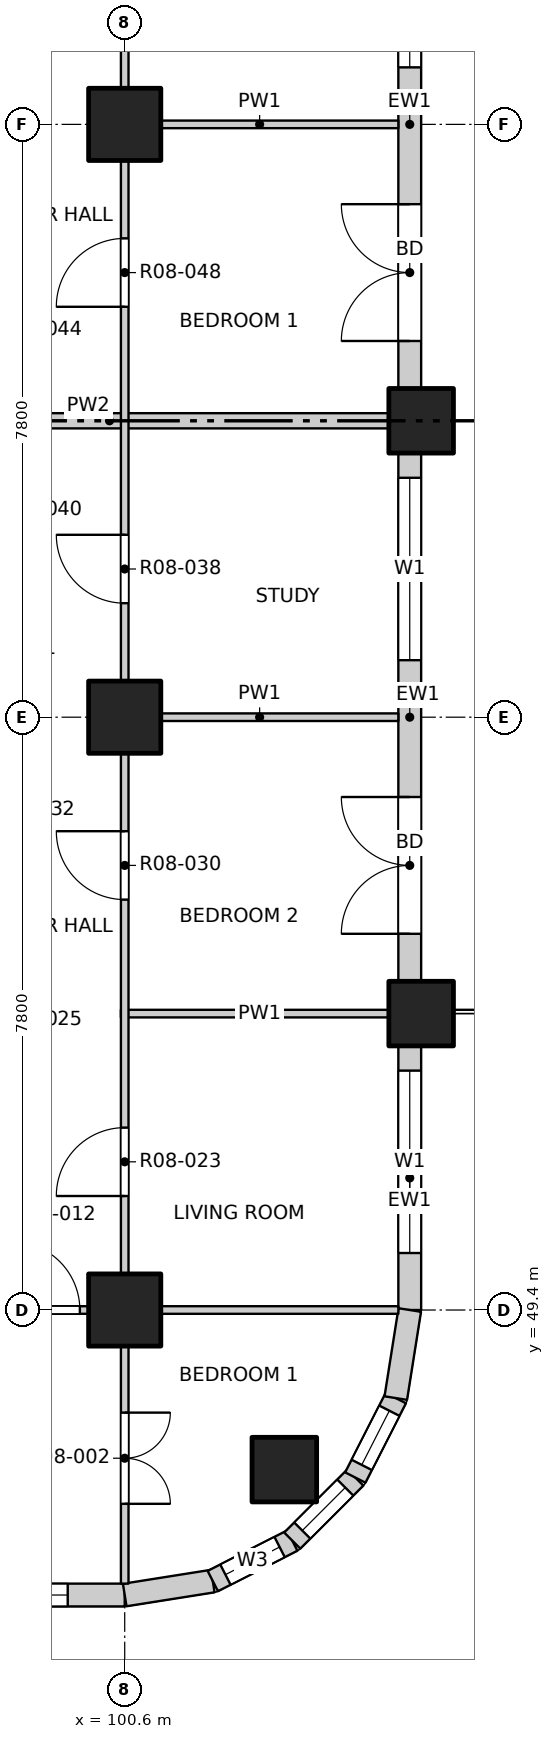
"""IFC4 building model, lengths in metres.
Left out: names, types, materials, properties, quantities, classifications, styles, units other than length and angle.
Written with IfcOpenShell. Run it as: python <this file> out.ifc"""

import sys

from ifc_helpers import new_model, si_unit, direction, frame, frame_2d, origin, origin_2d, place, context, subcontext, project, spatial, rectangle, extrude, element, fill, save


model = new_model("IFC4")
c1 = context("Model", 3, precision=1e-05, world=origin(), true_north=direction((0.0, 1.0)))
c2 = subcontext(c1, "Body", "Model", "MODEL_VIEW")
j1 = project(units=[si_unit("LENGTHUNIT", "METRE"), si_unit("PLANEANGLEUNIT", "RADIAN")], contexts=[c1])
p1 = place(None, origin())
s1 = spatial("IfcSite", under=j1, at=p1, CompositionType="ELEMENT")
p2 = place(p1, origin())
s2 = spatial("IfcBuilding", under=s1, at=p2, CompositionType="ELEMENT")
p3 = place(p2, frame((0.0, 0.0, 99.9)))
s3 = spatial("IfcBuildingStorey", under=s2, at=p3, CompositionType="ELEMENT", Elevation=99.9)
for number, where, z_axis, x_axis in (
    (1, (102.7, 47.3, -0.3), (0.0, 0.0, 1.0), (1.0, 0.0, 0.0)),
    (2, (104.5, 53.3, -0.3), (0.0, 0.0, 1.0), (1.0, 0.0, 0.0)),
    (3, (104.5, 61.1, -0.3), (0.0, 0.0, 1.0), (1.0, 0.0, 0.0)),
):
    element("IfcColumn", number, at=place(p3, frame(where, z_axis=z_axis, x_axis=x_axis)), inside=s3, PredefinedType="COLUMN", context=c2, shape_type="SweptSolid", body=[
        extrude(rectangle(XDim=0.85, YDim=0.85, at=origin_2d()), origin(), (0.0, 0.0, 1.0), 3.45),
    ])
for number, where, z_axis, x_axis in (
    (4, (100.6, 49.4, -0.3), (0.0, 0.0, 1.0), (1.0, 0.0, 0.0)),
    (5, (100.6, 57.2, -0.3), (0.0, 0.0, 1.0), (1.0, 0.0, 0.0)),
    (6, (100.6, 65.0, -0.3), (0.0, 0.0, 1.0), (1.0, 0.0, 0.0)),
):
    element("IfcColumn", number, at=place(p3, frame(where, z_axis=z_axis, x_axis=x_axis)), inside=s3, PredefinedType="COLUMN", context=c2, shape_type="SweptSolid", body=[
        extrude(rectangle(XDim=0.95, YDim=0.95, at=origin_2d()), origin(), (0.0, 0.0, 1.0), 3.45),
    ])
p4 = place(p3, frame((97.125, 45.65, 0.0), z_axis=(0.0, 0.0, 1.0), x_axis=(1.0, 0.0, 0.0)))
e7 = element("IfcWall", 7, at=p4, inside=s3, PredefinedType="SOLIDWALL", context=c2, shape_type="SweptSolid", body=[
    extrude(rectangle(XDim=3.475, YDim=0.3, at=frame_2d((1.738, 0.0))), origin(), (0.0, 0.0, 1.0), 2.7),
])
p5 = place(p4, frame((0.325, 0.0, 0.9)))
e8 = element("IfcOpeningElement", 8, at=p5, cuts=e7, PredefinedType="OPENING", context=c2, shape_type="SweptSolid", body=[
    extrude(rectangle(XDim=2.4, YDim=1.8, at=frame_2d((1.2, 0.9))), frame((0.0, 0.16, 0.0), z_axis=(0.0, -1.0, 0.0), x_axis=(1.0, 0.0, 0.0)), (0.0, 0.0, 1.0), 0.32),
])
p6 = place(p3, frame((104.35, 49.4, 0.0), z_axis=(0.0, 0.0, 1.0), x_axis=(0.0, 1.0, 0.0)))
e9 = element("IfcWall", 9, at=p6, inside=s3, PredefinedType="SOLIDWALL", context=c2, shape_type="SweptSolid", body=[
    extrude(rectangle(XDim=3.475, YDim=0.3, at=frame_2d((1.738, 0.0))), origin(), (0.0, 0.0, 1.0), 2.7),
])
p7 = place(p6, frame((0.75, 0.0, 0.9)))
e10 = element("IfcOpeningElement", 10, at=p7, cuts=e9, PredefinedType="OPENING", context=c2, shape_type="SweptSolid", body=[
    extrude(rectangle(XDim=2.4, YDim=1.8, at=frame_2d((1.2, 0.9))), frame((0.0, 0.16, 0.0), z_axis=(0.0, -1.0, 0.0), x_axis=(1.0, 0.0, 0.0)), (0.0, 0.0, 1.0), 0.32),
])
p8 = place(p3, frame((104.35, 53.725, 0.0), z_axis=(0.0, 0.0, 1.0), x_axis=(0.0, 1.0, 0.0)))
e11 = element("IfcWall", 11, at=p8, inside=s3, PredefinedType="SOLIDWALL", context=c2, shape_type="SweptSolid", body=[
    extrude(rectangle(XDim=6.95, YDim=0.3, at=frame_2d((3.475, 0.0))), origin(), (0.0, 0.0, 1.0), 2.7),
])
p9 = place(p8, frame((0.625, 0.0, 0.0)))
e12 = element("IfcOpeningElement", 12, at=p9, cuts=e11, PredefinedType="OPENING", context=c2, shape_type="SweptSolid", body=[
    extrude(rectangle(XDim=1.8, YDim=2.4, at=frame_2d((0.9, 1.2))), frame((0.0, 0.16, 0.0), z_axis=(0.0, -1.0, 0.0), x_axis=(1.0, 0.0, 0.0)), (0.0, 0.0, 1.0), 0.32),
])
p10 = place(p8, frame((4.225, 0.0, 0.9)))
e13 = element("IfcOpeningElement", 13, at=p10, cuts=e11, PredefinedType="OPENING", context=c2, shape_type="SweptSolid", body=[
    extrude(rectangle(XDim=2.4, YDim=1.8, at=frame_2d((1.2, 0.9))), frame((0.0, 0.16, 0.0), z_axis=(0.0, -1.0, 0.0), x_axis=(1.0, 0.0, 0.0)), (0.0, 0.0, 1.0), 0.32),
])
p11 = place(p3, frame((104.35, 61.525, 0.0), z_axis=(0.0, 0.0, 1.0), x_axis=(0.0, 1.0, 0.0)))
e14 = element("IfcWall", 14, at=p11, inside=s3, PredefinedType="SOLIDWALL", context=c2, shape_type="SweptSolid", body=[
    extrude(rectangle(XDim=6.95, YDim=0.3, at=frame_2d((3.475, 0.0))), origin(), (0.0, 0.0, 1.0), 2.7),
])
p12 = place(p11, frame((0.625, 0.0, 0.0)))
e15 = element("IfcOpeningElement", 15, at=p12, cuts=e14, PredefinedType="OPENING", context=c2, shape_type="SweptSolid", body=[
    extrude(rectangle(XDim=1.8, YDim=2.4, at=frame_2d((0.9, 1.2))), frame((0.0, 0.16, 0.0), z_axis=(0.0, -1.0, 0.0), x_axis=(1.0, 0.0, 0.0)), (0.0, 0.0, 1.0), 0.32),
])
p13 = place(p11, frame((4.225, 0.0, 0.9)))
e16 = element("IfcOpeningElement", 16, at=p13, cuts=e14, PredefinedType="OPENING", context=c2, shape_type="SweptSolid", body=[
    extrude(rectangle(XDim=2.4, YDim=1.8, at=frame_2d((1.2, 0.9))), frame((0.0, 0.16, 0.0), z_axis=(0.0, -1.0, 0.0), x_axis=(1.0, 0.0, 0.0)), (0.0, 0.0, 1.0), 0.32),
])
p14 = place(p3, frame((100.6, 45.65, 0.0), z_axis=(0.0, 0.0, 1.0), x_axis=(0.987678452879, 0.156496880861, 0.0)))
e17 = element("IfcWall", 17, at=p14, inside=s3, PredefinedType="SOLIDWALL", context=c2, shape_type="SweptSolid", body=[
    extrude(rectangle(XDim=1.173, YDim=0.3, at=frame_2d((0.586, 0.0))), origin(), (0.0, 0.0, 1.0), 2.7),
])
p15 = place(p3, frame((101.759, 45.833, 0.0), z_axis=(0.0, 0.0, 1.0), x_axis=(0.890988677504, 0.454025524128, 0.0)))
e18 = element("IfcWall", 18, at=p15, inside=s3, PredefinedType="SOLIDWALL", context=c2, shape_type="SweptSolid", body=[
    extrude(rectangle(XDim=1.173, YDim=0.3, at=frame_2d((0.587, 0.0))), origin(), (0.0, 0.0, 1.0), 2.7),
])
p16 = place(p15, frame((0.187, 0.0, 0.9)))
e19 = element("IfcOpeningElement", 19, at=p16, cuts=e18, PredefinedType="OPENING", context=c2, shape_type="SweptSolid", body=[
    extrude(rectangle(XDim=0.8, YDim=1.2, at=frame_2d((0.4, 0.6))), frame((0.0, 0.16, 0.0), z_axis=(0.0, -1.0, 0.0), x_axis=(1.0, 0.0, 0.0)), (0.0, 0.0, 1.0), 0.32),
])
p17 = place(p3, frame((102.804, 46.366, 0.0), z_axis=(0.0, 0.0, 1.0), x_axis=(0.707106781187, 0.707106781187, 0.0)))
e20 = element("IfcWall", 20, at=p17, inside=s3, PredefinedType="SOLIDWALL", context=c2, shape_type="SweptSolid", body=[
    extrude(rectangle(XDim=1.173, YDim=0.3, at=frame_2d((0.586, 0.0))), origin(), (0.0, 0.0, 1.0), 2.7),
])
p18 = place(p17, frame((0.187, 0.0, 0.9)))
e21 = element("IfcOpeningElement", 21, at=p18, cuts=e20, PredefinedType="OPENING", context=c2, shape_type="SweptSolid", body=[
    extrude(rectangle(XDim=0.8, YDim=1.2, at=frame_2d((0.4, 0.6))), frame((0.0, 0.16, 0.0), z_axis=(0.0, -1.0, 0.0), x_axis=(1.0, 0.0, 0.0)), (0.0, 0.0, 1.0), 0.32),
])
p19 = place(p3, frame((103.634, 47.196, 0.0), z_axis=(0.0, 0.0, 1.0), x_axis=(0.454025524128, 0.890988677504, 0.0)))
e22 = element("IfcWall", 22, at=p19, inside=s3, PredefinedType="SOLIDWALL", context=c2, shape_type="SweptSolid", body=[
    extrude(rectangle(XDim=1.173, YDim=0.3, at=frame_2d((0.587, 0.0))), origin(), (0.0, 0.0, 1.0), 2.7),
])
p20 = place(p19, frame((0.187, 0.0, 0.9)))
e23 = element("IfcOpeningElement", 23, at=p20, cuts=e22, PredefinedType="OPENING", context=c2, shape_type="SweptSolid", body=[
    extrude(rectangle(XDim=0.8, YDim=1.2, at=frame_2d((0.4, 0.6))), frame((0.0, 0.16, 0.0), z_axis=(0.0, -1.0, 0.0), x_axis=(1.0, 0.0, 0.0)), (0.0, 0.0, 1.0), 0.32),
])
p21 = place(p3, frame((104.167, 48.241, 0.0), z_axis=(0.0, 0.0, 1.0), x_axis=(0.156496880861, 0.987678452879, 0.0)))
e24 = element("IfcWall", 24, at=p21, inside=s3, PredefinedType="SOLIDWALL", context=c2, shape_type="SweptSolid", body=[
    extrude(rectangle(XDim=1.173, YDim=0.3, at=frame_2d((0.586, 0.0))), origin(), (0.0, 0.0, 1.0), 2.7),
])
p22 = place(p3, frame((65.8, 49.4, 0.0), z_axis=(0.0, 0.0, 1.0), x_axis=(1.0, 0.0, 0.0)))
e25 = element("IfcWall", 25, at=p22, inside=s3, PredefinedType="PARTITIONING", context=c2, shape_type="SweptSolid", body=[
    extrude(rectangle(XDim=38.4, YDim=0.1, at=frame_2d((19.2, 0.0))), origin(), (0.0, 0.0, 1.0), 3.15),
])
p23 = place(p22, frame((4.19, 0.0, 0.0)))
e26 = element("IfcOpeningElement", 26, at=p23, cuts=e25, PredefinedType="OPENING", context=c2, shape_type="SweptSolid", body=[
    extrude(rectangle(XDim=0.9, YDim=2.1, at=frame_2d((0.45, 1.05))), frame((0.0, 0.06, 0.0), z_axis=(0.0, -1.0, 0.0), x_axis=(1.0, 0.0, 0.0)), (0.0, 0.0, 1.0), 0.12),
])
p24 = place(p22, frame((9.0, 0.0, 0.0)))
e27 = element("IfcOpeningElement", 27, at=p24, cuts=e25, PredefinedType="OPENING", context=c2, shape_type="SweptSolid", body=[
    extrude(rectangle(XDim=0.9, YDim=2.1, at=frame_2d((0.45, 1.05))), frame((0.0, 0.06, 0.0), z_axis=(0.0, -1.0, 0.0), x_axis=(1.0, 0.0, 0.0)), (0.0, 0.0, 1.0), 0.12),
])
p25 = place(p22, frame((12.9, 0.0, 0.0)))
e28 = element("IfcOpeningElement", 28, at=p25, cuts=e25, PredefinedType="OPENING", context=c2, shape_type="SweptSolid", body=[
    extrude(rectangle(XDim=0.9, YDim=2.1, at=frame_2d((0.45, 1.05))), frame((0.0, 0.06, 0.0), z_axis=(0.0, -1.0, 0.0), x_axis=(1.0, 0.0, 0.0)), (0.0, 0.0, 1.0), 0.12),
])
p26 = place(p22, frame((16.8, 0.0, 0.0)))
e29 = element("IfcOpeningElement", 29, at=p26, cuts=e25, PredefinedType="OPENING", context=c2, shape_type="SweptSolid", body=[
    extrude(rectangle(XDim=0.9, YDim=2.1, at=frame_2d((0.45, 1.05))), frame((0.0, 0.06, 0.0), z_axis=(0.0, -1.0, 0.0), x_axis=(1.0, 0.0, 0.0)), (0.0, 0.0, 1.0), 0.12),
])
p27 = place(p22, frame((20.7, 0.0, 0.0)))
e30 = element("IfcOpeningElement", 30, at=p27, cuts=e25, PredefinedType="OPENING", context=c2, shape_type="SweptSolid", body=[
    extrude(rectangle(XDim=0.9, YDim=2.1, at=frame_2d((0.45, 1.05))), frame((0.0, 0.06, 0.0), z_axis=(0.0, -1.0, 0.0), x_axis=(1.0, 0.0, 0.0)), (0.0, 0.0, 1.0), 0.12),
])
p28 = place(p22, frame((24.6, 0.0, 0.0)))
e31 = element("IfcOpeningElement", 31, at=p28, cuts=e25, PredefinedType="OPENING", context=c2, shape_type="SweptSolid", body=[
    extrude(rectangle(XDim=0.9, YDim=2.1, at=frame_2d((0.45, 1.05))), frame((0.0, 0.06, 0.0), z_axis=(0.0, -1.0, 0.0), x_axis=(1.0, 0.0, 0.0)), (0.0, 0.0, 1.0), 0.12),
])
p29 = place(p22, frame((28.5, 0.0, 0.0)))
e32 = element("IfcOpeningElement", 32, at=p29, cuts=e25, PredefinedType="OPENING", context=c2, shape_type="SweptSolid", body=[
    extrude(rectangle(XDim=0.9, YDim=2.1, at=frame_2d((0.45, 1.05))), frame((0.0, 0.06, 0.0), z_axis=(0.0, -1.0, 0.0), x_axis=(1.0, 0.0, 0.0)), (0.0, 0.0, 1.0), 0.12),
])
p30 = place(p22, frame((33.31, 0.0, 0.0)))
e33 = element("IfcOpeningElement", 33, at=p30, cuts=e25, PredefinedType="OPENING", context=c2, shape_type="SweptSolid", body=[
    extrude(rectangle(XDim=0.9, YDim=2.1, at=frame_2d((0.45, 1.05))), frame((0.0, 0.06, 0.0), z_axis=(0.0, -1.0, 0.0), x_axis=(1.0, 0.0, 0.0)), (0.0, 0.0, 1.0), 0.12),
])
for number, where, z_axis, x_axis in (
    (34, (100.55, 53.3, 0.0), (0.0, 0.0, 1.0), (1.0, 0.0, 0.0)),
    (35, (100.55, 57.2, 0.0), (0.0, 0.0, 1.0), (1.0, 0.0, 0.0)),
):
    element("IfcWall", number, at=place(p3, frame(where, z_axis=z_axis, x_axis=x_axis)), inside=s3, PredefinedType="PARTITIONING", context=c2, shape_type="SweptSolid", body=[
        extrude(rectangle(XDim=3.65, YDim=0.1, at=frame_2d((1.825, 0.0))), origin(), (0.0, 0.0, 1.0), 3.15),
    ])
p31 = place(p3, frame((96.6, 61.1, 0.0), z_axis=(0.0, 0.0, 1.0), x_axis=(1.0, 0.0, 0.0)))
e36 = element("IfcWall", 36, at=p31, inside=s3, PredefinedType="PARTITIONING", context=c2, shape_type="SweptSolid", body=[
    extrude(rectangle(XDim=7.6, YDim=0.2, at=frame_2d((3.8, 0.0))), origin(), (0.0, 0.0, 1.0), 2.55),
])
p32 = place(p3, frame((100.55, 65.0, 0.0), z_axis=(0.0, 0.0, 1.0), x_axis=(1.0, 0.0, 0.0)))
e37 = element("IfcWall", 37, at=p32, inside=s3, PredefinedType="PARTITIONING", context=c2, shape_type="SweptSolid", body=[
    extrude(rectangle(XDim=3.65, YDim=0.1, at=frame_2d((1.825, 0.0))), origin(), (0.0, 0.0, 1.0), 3.15),
])
p33 = place(p3, frame((100.6, 45.8, 0.0), z_axis=(0.0, 0.0, 1.0), x_axis=(0.0, 1.0, 0.0)))
e38 = element("IfcWall", 38, at=p33, inside=s3, PredefinedType="PARTITIONING", context=c2, shape_type="SweptSolid", body=[
    extrude(rectangle(XDim=38.4, YDim=0.1, at=frame_2d((19.2, 0.0))), origin(), (0.0, 0.0, 1.0), 3.15),
])
p34 = place(p33, frame((1.05, 0.0, 0.0)))
e39 = element("IfcOpeningElement", 39, at=p34, cuts=e38, PredefinedType="OPENING", context=c2, shape_type="SweptSolid", body=[
    extrude(rectangle(XDim=1.2, YDim=2.1, at=frame_2d((0.6, 1.05))), frame((0.0, 0.06, 0.0), z_axis=(0.0, -1.0, 0.0), x_axis=(1.0, 0.0, 0.0)), (0.0, 0.0, 1.0), 0.12),
])
p35 = place(p33, frame((5.1, 0.0, 0.0)))
e40 = element("IfcOpeningElement", 40, at=p35, cuts=e38, PredefinedType="OPENING", context=c2, shape_type="SweptSolid", body=[
    extrude(rectangle(XDim=0.9, YDim=2.1, at=frame_2d((0.45, 1.05))), frame((0.0, 0.06, 0.0), z_axis=(0.0, -1.0, 0.0), x_axis=(1.0, 0.0, 0.0)), (0.0, 0.0, 1.0), 0.12),
])
p36 = place(p33, frame((9.0, 0.0, 0.0)))
e41 = element("IfcOpeningElement", 41, at=p36, cuts=e38, PredefinedType="OPENING", context=c2, shape_type="SweptSolid", body=[
    extrude(rectangle(XDim=0.9, YDim=2.1, at=frame_2d((0.45, 1.05))), frame((0.0, 0.06, 0.0), z_axis=(0.0, -1.0, 0.0), x_axis=(1.0, 0.0, 0.0)), (0.0, 0.0, 1.0), 0.12),
])
p37 = place(p33, frame((12.9, 0.0, 0.0)))
e42 = element("IfcOpeningElement", 42, at=p37, cuts=e38, PredefinedType="OPENING", context=c2, shape_type="SweptSolid", body=[
    extrude(rectangle(XDim=0.9, YDim=2.1, at=frame_2d((0.45, 1.05))), frame((0.0, 0.06, 0.0), z_axis=(0.0, -1.0, 0.0), x_axis=(1.0, 0.0, 0.0)), (0.0, 0.0, 1.0), 0.12),
])
p38 = place(p33, frame((16.8, 0.0, 0.0)))
e43 = element("IfcOpeningElement", 43, at=p38, cuts=e38, PredefinedType="OPENING", context=c2, shape_type="SweptSolid", body=[
    extrude(rectangle(XDim=0.9, YDim=2.1, at=frame_2d((0.45, 1.05))), frame((0.0, 0.06, 0.0), z_axis=(0.0, -1.0, 0.0), x_axis=(1.0, 0.0, 0.0)), (0.0, 0.0, 1.0), 0.12),
])
p39 = place(p33, frame((20.7, 0.0, 0.0)))
e44 = element("IfcOpeningElement", 44, at=p39, cuts=e38, PredefinedType="OPENING", context=c2, shape_type="SweptSolid", body=[
    extrude(rectangle(XDim=0.9, YDim=2.1, at=frame_2d((0.45, 1.05))), frame((0.0, 0.06, 0.0), z_axis=(0.0, -1.0, 0.0), x_axis=(1.0, 0.0, 0.0)), (0.0, 0.0, 1.0), 0.12),
])
p40 = place(p33, frame((24.6, 0.0, 0.0)))
e45 = element("IfcOpeningElement", 45, at=p40, cuts=e38, PredefinedType="OPENING", context=c2, shape_type="SweptSolid", body=[
    extrude(rectangle(XDim=0.9, YDim=2.1, at=frame_2d((0.45, 1.05))), frame((0.0, 0.06, 0.0), z_axis=(0.0, -1.0, 0.0), x_axis=(1.0, 0.0, 0.0)), (0.0, 0.0, 1.0), 0.12),
])
p41 = place(p33, frame((28.5, 0.0, 0.0)))
e46 = element("IfcOpeningElement", 46, at=p41, cuts=e38, PredefinedType="OPENING", context=c2, shape_type="SweptSolid", body=[
    extrude(rectangle(XDim=0.9, YDim=2.1, at=frame_2d((0.45, 1.05))), frame((0.0, 0.06, 0.0), z_axis=(0.0, -1.0, 0.0), x_axis=(1.0, 0.0, 0.0)), (0.0, 0.0, 1.0), 0.12),
])
p42 = place(p33, frame((32.4, 0.0, 0.0)))
e47 = element("IfcOpeningElement", 47, at=p42, cuts=e38, PredefinedType="OPENING", context=c2, shape_type="SweptSolid", body=[
    extrude(rectangle(XDim=0.9, YDim=2.1, at=frame_2d((0.45, 1.05))), frame((0.0, 0.06, 0.0), z_axis=(0.0, -1.0, 0.0), x_axis=(1.0, 0.0, 0.0)), (0.0, 0.0, 1.0), 0.12),
])
p43 = place(p33, frame((36.15, 0.0, 0.0)))
e48 = element("IfcOpeningElement", 48, at=p43, cuts=e38, PredefinedType="OPENING", context=c2, shape_type="SweptSolid", body=[
    extrude(rectangle(XDim=1.2, YDim=2.1, at=frame_2d((0.6, 1.05))), frame((0.0, 0.06, 0.0), z_axis=(0.0, -1.0, 0.0), x_axis=(1.0, 0.0, 0.0)), (0.0, 0.0, 1.0), 0.12),
])
p44 = place(p5, origin())
e49 = element("IfcWindow", 49, at=p44, inside=s3, PartitioningType="DOUBLE_PANEL_VERTICAL", PredefinedType="WINDOW", context=c2, shape_type="SweptSolid", body=[
    extrude(rectangle(XDim=2.4, YDim=1.8, at=frame_2d((1.2, 0.9))), frame((0.0, 0.03, 0.0), z_axis=(0.0, -1.0, 0.0), x_axis=(1.0, 0.0, 0.0)), (0.0, 0.0, 1.0), 0.06),
])
fill(e8, e49)
p45 = place(p7, origin())
e50 = element("IfcWindow", 50, at=p45, inside=s3, PartitioningType="DOUBLE_PANEL_VERTICAL", PredefinedType="WINDOW", context=c2, shape_type="SweptSolid", body=[
    extrude(rectangle(XDim=2.4, YDim=1.8, at=frame_2d((1.2, 0.9))), frame((0.0, 0.03, 0.0), z_axis=(0.0, -1.0, 0.0), x_axis=(1.0, 0.0, 0.0)), (0.0, 0.0, 1.0), 0.06),
])
fill(e10, e50)
p46 = place(p9, origin())
e51 = element("IfcDoor", 51, at=p46, inside=s3, OperationType="DOUBLE_DOOR_SINGLE_SWING", PredefinedType="DOOR", context=c2, shape_type="SweptSolid", body=[
    extrude(rectangle(XDim=1.8, YDim=2.4, at=frame_2d((0.9, 1.2))), frame((0.0, 0.025, 0.0), z_axis=(0.0, -1.0, 0.0), x_axis=(1.0, 0.0, 0.0)), (0.0, 0.0, 1.0), 0.05),
])
fill(e12, e51)
p47 = place(p10, origin())
e52 = element("IfcWindow", 52, at=p47, inside=s3, PartitioningType="DOUBLE_PANEL_VERTICAL", PredefinedType="WINDOW", context=c2, shape_type="SweptSolid", body=[
    extrude(rectangle(XDim=2.4, YDim=1.8, at=frame_2d((1.2, 0.9))), frame((0.0, 0.03, 0.0), z_axis=(0.0, -1.0, 0.0), x_axis=(1.0, 0.0, 0.0)), (0.0, 0.0, 1.0), 0.06),
])
fill(e13, e52)
p48 = place(p12, origin())
e53 = element("IfcDoor", 53, at=p48, inside=s3, OperationType="DOUBLE_DOOR_SINGLE_SWING", PredefinedType="DOOR", context=c2, shape_type="SweptSolid", body=[
    extrude(rectangle(XDim=1.8, YDim=2.4, at=frame_2d((0.9, 1.2))), frame((0.0, 0.025, 0.0), z_axis=(0.0, -1.0, 0.0), x_axis=(1.0, 0.0, 0.0)), (0.0, 0.0, 1.0), 0.05),
])
fill(e15, e53)
p49 = place(p13, origin())
e54 = element("IfcWindow", 54, at=p49, inside=s3, PartitioningType="DOUBLE_PANEL_VERTICAL", PredefinedType="WINDOW", context=c2, shape_type="SweptSolid", body=[
    extrude(rectangle(XDim=2.4, YDim=1.8, at=frame_2d((1.2, 0.9))), frame((0.0, 0.03, 0.0), z_axis=(0.0, -1.0, 0.0), x_axis=(1.0, 0.0, 0.0)), (0.0, 0.0, 1.0), 0.06),
])
fill(e16, e54)
p50 = place(p16, origin())
e55 = element("IfcWindow", 55, at=p50, inside=s3, PartitioningType="SINGLE_PANEL", PredefinedType="WINDOW", context=c2, shape_type="SweptSolid", body=[
    extrude(rectangle(XDim=0.8, YDim=1.2, at=frame_2d((0.4, 0.6))), frame((0.0, 0.03, 0.0), z_axis=(0.0, -1.0, 0.0), x_axis=(1.0, 0.0, 0.0)), (0.0, 0.0, 1.0), 0.06),
])
fill(e19, e55)
p51 = place(p18, origin())
e56 = element("IfcWindow", 56, at=p51, inside=s3, PartitioningType="SINGLE_PANEL", PredefinedType="WINDOW", context=c2, shape_type="SweptSolid", body=[
    extrude(rectangle(XDim=0.8, YDim=1.2, at=frame_2d((0.4, 0.6))), frame((0.0, 0.03, 0.0), z_axis=(0.0, -1.0, 0.0), x_axis=(1.0, 0.0, 0.0)), (0.0, 0.0, 1.0), 0.06),
])
fill(e21, e56)
p52 = place(p20, origin())
e57 = element("IfcWindow", 57, at=p52, inside=s3, PartitioningType="SINGLE_PANEL", PredefinedType="WINDOW", context=c2, shape_type="SweptSolid", body=[
    extrude(rectangle(XDim=0.8, YDim=1.2, at=frame_2d((0.4, 0.6))), frame((0.0, 0.03, 0.0), z_axis=(0.0, -1.0, 0.0), x_axis=(1.0, 0.0, 0.0)), (0.0, 0.0, 1.0), 0.06),
])
fill(e23, e57)
p53 = place(p34, origin())
e58 = element("IfcDoor", 58, at=p53, inside=s3, OperationType="DOUBLE_DOOR_SINGLE_SWING", PredefinedType="DOOR", context=c2, shape_type="SweptSolid", body=[
    extrude(rectangle(XDim=1.2, YDim=2.1, at=frame_2d((0.6, 1.05))), frame((0.0, 0.025, 0.0), z_axis=(0.0, -1.0, 0.0), x_axis=(1.0, 0.0, 0.0)), (0.0, 0.0, 1.0), 0.05),
])
fill(e39, e58)
p54 = place(p30, origin())
e59 = element("IfcDoor", 59, at=p54, inside=s3, OperationType="SINGLE_SWING_LEFT", PredefinedType="DOOR", context=c2, shape_type="SweptSolid", body=[
    extrude(rectangle(XDim=0.9, YDim=2.1, at=frame_2d((0.45, 1.05))), frame((0.0, 0.025, 0.0), z_axis=(0.0, -1.0, 0.0), x_axis=(1.0, 0.0, 0.0)), (0.0, 0.0, 1.0), 0.05),
])
fill(e33, e59)
p55 = place(p35, origin())
e60 = element("IfcDoor", 60, at=p55, inside=s3, OperationType="SINGLE_SWING_LEFT", PredefinedType="DOOR", context=c2, shape_type="SweptSolid", body=[
    extrude(rectangle(XDim=0.9, YDim=2.1, at=frame_2d((0.45, 1.05))), frame((0.0, 0.025, 0.0), z_axis=(0.0, -1.0, 0.0), x_axis=(1.0, 0.0, 0.0)), (0.0, 0.0, 1.0), 0.05),
])
fill(e40, e60)
p56 = place(p36, origin())
e61 = element("IfcDoor", 61, at=p56, inside=s3, OperationType="SINGLE_SWING_RIGHT", PredefinedType="DOOR", context=c2, shape_type="SweptSolid", body=[
    extrude(rectangle(XDim=0.9, YDim=2.1, at=frame_2d((0.45, 1.05))), frame((0.0, 0.025, 0.0), z_axis=(0.0, -1.0, 0.0), x_axis=(1.0, 0.0, 0.0)), (0.0, 0.0, 1.0), 0.05),
])
fill(e41, e61)
p57 = place(p37, origin())
e62 = element("IfcDoor", 62, at=p57, inside=s3, OperationType="SINGLE_SWING_RIGHT", PredefinedType="DOOR", context=c2, shape_type="SweptSolid", body=[
    extrude(rectangle(XDim=0.9, YDim=2.1, at=frame_2d((0.45, 1.05))), frame((0.0, 0.025, 0.0), z_axis=(0.0, -1.0, 0.0), x_axis=(1.0, 0.0, 0.0)), (0.0, 0.0, 1.0), 0.05),
])
fill(e42, e62)
p58 = place(p38, origin())
e63 = element("IfcDoor", 63, at=p58, inside=s3, OperationType="SINGLE_SWING_LEFT", PredefinedType="DOOR", context=c2, shape_type="SweptSolid", body=[
    extrude(rectangle(XDim=0.9, YDim=2.1, at=frame_2d((0.45, 1.05))), frame((0.0, 0.025, 0.0), z_axis=(0.0, -1.0, 0.0), x_axis=(1.0, 0.0, 0.0)), (0.0, 0.0, 1.0), 0.05),
])
fill(e43, e63)
save(model, sys.argv[1])
